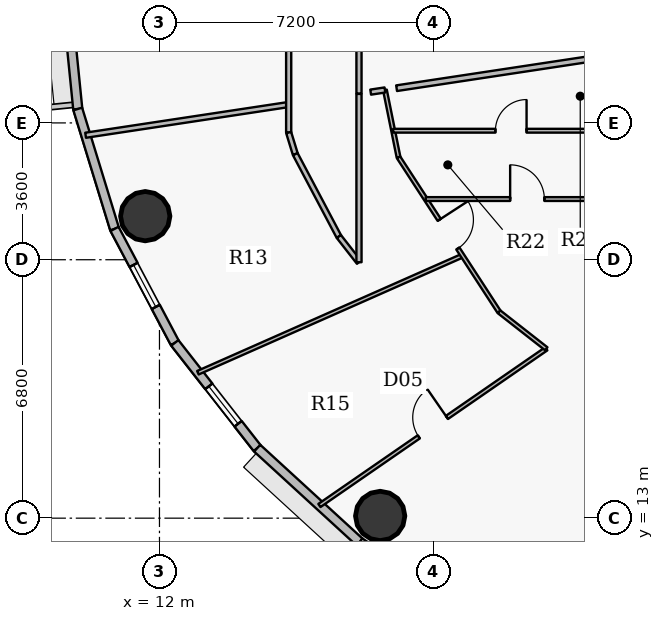
"""IFC4 building model, lengths in metres.
Left out: names, types, materials, properties, quantities, classifications, styles, units other than length and angle.
Written with IfcOpenShell. Run it as: python <this file> out.ifc"""

import sys

from ifc_helpers import new_model, si_unit, direction, frame, frame_2d, origin, origin_2d, place, context, subcontext, project, spatial, rectangle, hollow_circle, extrude, source, transform, mapped, element, fill, save


model = new_model("IFC4")
c1 = context("Model", 3, precision=1e-05, world=origin(), true_north=direction((0.0, 1.0)))
c2 = subcontext(c1, "Body", "Model", "MODEL_VIEW")
j1 = project(units=[si_unit("LENGTHUNIT", "METRE"), si_unit("PLANEANGLEUNIT", "RADIAN")], contexts=[c1])
p1 = place(None, origin())
s1 = spatial("IfcSite", under=j1, at=p1, CompositionType="ELEMENT")
p2 = place(p1, origin())
s2 = spatial("IfcBuilding", under=s1, at=p2, CompositionType="ELEMENT")
p3 = place(p2, frame((0.0, 0.0, 159.9)))
s3 = spatial("IfcBuildingStorey", under=s2, at=p3, CompositionType="ELEMENT", Elevation=159.9)
for number, where, z_axis, x_axis in (
    (1, (11.625, 20.947, 0.0), (0.0, 0.0, 1.0), (1.0, 0.0, 0.0)),
    (2, (17.808, 13.058, 0.0), (0.0, 0.0, 1.0), (1.0, 0.0, 0.0)),
):
    element("IfcColumn", number, at=place(p3, frame(where, z_axis=z_axis, x_axis=x_axis)), inside=s3, PredefinedType="COLUMN", context=c2, shape_type="SweptSolid", body=[
        extrude(hollow_circle(Radius=0.65, WallThickness=0.04, at=origin_2d()), origin(), (0.0, 0.0, 1.0), 3.75),
    ])
p4 = place(p3, frame((9.85, 23.766, 0.0), z_axis=(0.0, 0.0, 1.0), x_axis=(-0.100061534614, 0.994981250723, 0.0)))
e3 = element("IfcWall", 3, at=p4, inside=s3, PredefinedType="SOLIDWALL", context=c2, shape_type="SweptSolid", body=[
    extrude(rectangle(XDim=3.25, YDim=0.24, at=frame_2d((1.625, 0.0))), origin(), (0.0, 0.0, 1.0), 3.5),
])
p5 = place(p3, frame((10.817, 20.611, 0.0), z_axis=(0.0, 0.0, 1.0), x_axis=(-0.293097995113, 0.956082405058, 0.0)))
e4 = element("IfcWall", 4, at=p5, inside=s3, PredefinedType="SOLIDWALL", context=c2, shape_type="SweptSolid", body=[
    extrude(rectangle(XDim=3.3, YDim=0.24, at=frame_2d((1.65, 0.0))), origin(), (0.0, 0.0, 1.0), 3.5),
])
p6 = place(p3, frame((12.404, 17.612, 0.0), z_axis=(0.0, 0.0, 1.0), x_axis=(-0.467586874938, 0.88394712194, 0.0)))
e5 = element("IfcWall", 5, at=p6, inside=s3, PredefinedType="SOLIDWALL", context=c2, shape_type="SweptSolid", body=[
    extrude(rectangle(XDim=3.393, YDim=0.24, at=frame_2d((1.697, 0.0))), origin(), (0.0, 0.0, 1.0), 3.5),
])
p7 = place(p6, frame((1.072, 0.0, 0.9)))
e6 = element("IfcOpeningElement", 6, at=p7, cuts=e5, PredefinedType="OPENING", context=c2, shape_type="SweptSolid", body=[
    extrude(rectangle(XDim=1.25, YDim=1.65, at=origin_2d()), frame((0.625, 0.13, 0.825), z_axis=(0.0, -1.0, 0.0), x_axis=(1.0, 0.0, 0.0)), (0.0, 0.0, 1.0), 0.26),
])
p8 = place(p3, frame((14.572, 14.842, 0.0), z_axis=(0.0, 0.0, 1.0), x_axis=(-0.616287674549, 0.787521112224, 0.0)))
e7 = element("IfcWall", 7, at=p8, inside=s3, PredefinedType="SOLIDWALL", context=c2, shape_type="SweptSolid", body=[
    extrude(rectangle(XDim=3.517, YDim=0.24, at=frame_2d((1.759, 0.0))), origin(), (0.0, 0.0, 1.0), 3.5),
])
p9 = place(p8, frame((0.816, 0.0, 0.9)))
e8 = element("IfcOpeningElement", 8, at=p9, cuts=e7, PredefinedType="OPENING", context=c2, shape_type="SweptSolid", body=[
    extrude(rectangle(XDim=1.25, YDim=1.65, at=origin_2d()), frame((0.625, 0.13, 0.825), z_axis=(0.0, -1.0, 0.0), x_axis=(1.0, 0.0, 0.0)), (0.0, 0.0, 1.0), 0.26),
])
p10 = place(p3, frame((17.268, 12.369, 0.0), z_axis=(0.0, 0.0, 1.0), x_axis=(-0.737076565834, 0.675809245349, 0.0)))
e9 = element("IfcWall", 9, at=p10, inside=s3, PredefinedType="SOLIDWALL", context=c2, shape_type="SweptSolid", body=[
    extrude(rectangle(XDim=3.658, YDim=0.24, at=frame_2d((1.829, 0.0))), origin(), (0.0, 0.0, 1.0), 3.5),
])
p11 = place(p3, frame((20.427, 10.257, 0.0), z_axis=(0.0, 0.0, 1.0), x_axis=(-0.831228998277, 0.555930168657, 0.0)))
e10 = element("IfcWall", 10, at=p11, inside=s3, PredefinedType="SOLIDWALL", context=c2, shape_type="SweptSolid", body=[
    extrude(rectangle(XDim=3.8, YDim=0.24, at=frame_2d((1.9, 0.0))), origin(), (0.0, 0.0, 1.0), 3.5),
])
p12 = place(p3, frame((10.057, 23.075, 0.0), z_axis=(0.0, 0.0, 1.0), x_axis=(0.988756022356, 0.14953771516, 0.0)))
e11 = element("IfcWall", 11, at=p12, inside=s3, PredefinedType="PARTITIONING", context=c2, shape_type="SweptSolid", body=[
    extrude(rectangle(XDim=5.404, YDim=0.135, at=frame_2d((2.702, 0.0))), origin(), (0.0, 0.0, 1.0), 2.935),
])
p13 = place(p3, frame((13.012, 16.827, 0.0), z_axis=(0.0, 0.0, 1.0), x_axis=(0.914460954348, 0.404674144185, 0.0)))
e12 = element("IfcWall", 12, at=p13, inside=s3, PredefinedType="PARTITIONING", context=c2, shape_type="SweptSolid", body=[
    extrude(rectangle(XDim=7.614, YDim=0.1, at=frame_2d((3.807, 0.0))), origin(), (0.0, 0.0, 1.0), 2.935),
])
p14 = place(p3, frame((15.4, 23.146, 0.0), z_axis=(0.0, 0.0, 1.0), x_axis=(0.0, 1.0, 0.0)))
e13 = element("IfcWall", 13, at=p14, inside=s3, PredefinedType="PARTITIONING", context=c2, shape_type="SweptSolid", body=[
    extrude(rectangle(XDim=4.804, YDim=0.135, at=frame_2d((2.402, 0.0))), origin(), (0.0, 0.0, 1.0), 2.935),
])
p15 = place(p14, frame((2.251, 0.0, 0.0)))
e14 = element("IfcOpeningElement", 14, at=p15, cuts=e13, PredefinedType="OPENING", context=c2, shape_type="SweptSolid", body=[
    extrude(rectangle(XDim=1.0, YDim=2.15, at=origin_2d()), frame((0.5, 0.078, 1.075), z_axis=(0.0, -1.0, 0.0), x_axis=(1.0, 0.0, 0.0)), (0.0, 0.0, 1.0), 0.155),
])
p16 = place(p3, frame((15.4, 23.146, 0.0), z_axis=(0.0, 0.0, 1.0), x_axis=(0.293335154151, -0.956009669061, 0.0)))
e15 = element("IfcWall", 15, at=p16, inside=s3, PredefinedType="PARTITIONING", context=c2, shape_type="SweptSolid", body=[
    extrude(rectangle(XDim=0.594, YDim=0.135, at=frame_2d((0.297, 0.0))), origin(), (0.0, 0.0, 1.0), 3.5),
])
p17 = place(p3, frame((15.574, 22.578, 0.0), z_axis=(0.0, 0.0, 1.0), x_axis=(0.46757196543, -0.883955008552, 0.0)))
e16 = element("IfcWall", 16, at=p17, inside=s3, PredefinedType="PARTITIONING", context=c2, shape_type="SweptSolid", body=[
    extrude(rectangle(XDim=2.451, YDim=0.135, at=frame_2d((1.226, 0.0))), origin(), (0.0, 0.0, 1.0), 2.935),
])
p18 = place(p3, frame((16.209, 13.333, 0.0), z_axis=(0.0, 0.0, 1.0), x_axis=(0.82287966827, 0.568215673444, 0.0)))
e17 = element("IfcWall", 17, at=p18, inside=s3, PredefinedType="PARTITIONING", context=c2, shape_type="SweptSolid", body=[
    extrude(rectangle(XDim=7.255, YDim=0.1, at=frame_2d((3.628, 0.0))), origin(), (0.0, 0.0, 1.0), 2.935),
])
p19 = place(p18, frame((3.177, 0.0, 0.0)))
e18 = element("IfcOpeningElement", 18, at=p19, cuts=e17, PredefinedType="OPENING", context=c2, shape_type="SweptSolid", body=[
    extrude(rectangle(XDim=0.9, YDim=2.1, at=origin_2d()), frame((0.45, 0.06, 1.05), z_axis=(0.0, -1.0, 0.0), x_axis=(1.0, 0.0, 0.0)), (0.0, 0.0, 1.0), 0.12),
])
p20 = place(p3, frame((16.72, 20.411, 0.0), z_axis=(0.0, 0.0, 1.0), x_axis=(0.616377221056, -0.787451027914, 0.0)))
e19 = element("IfcWall", 19, at=p20, inside=s3, PredefinedType="PARTITIONING", context=c2, shape_type="SweptSolid", body=[
    extrude(rectangle(XDim=0.859, YDim=0.135, at=frame_2d((0.43, 0.0))), origin(), (0.0, 0.0, 1.0), 3.5),
])
p21 = place(p3, frame((17.25, 19.734, 0.0), z_axis=(0.0, 0.0, 1.0), x_axis=(0.0, 1.0, 0.0)))
e20 = element("IfcWall", 20, at=p21, inside=s3, PredefinedType="PARTITIONING", context=c2, shape_type="SweptSolid", body=[
    extrude(rectangle(XDim=4.429, YDim=0.135, at=frame_2d((2.215, 0.0))), origin(), (0.0, 0.0, 1.0), 2.935),
])
p22 = place(p3, frame((17.933, 24.267, 0.0), z_axis=(0.0, 0.0, 1.0), x_axis=(0.198166528342, -0.980168366682, 0.0)))
e21 = element("IfcWall", 21, at=p22, inside=s3, PredefinedType="PARTITIONING", context=c2, shape_type="SweptSolid", body=[
    extrude(rectangle(XDim=1.809, YDim=0.1, at=frame_2d((0.904, 0.0))), origin(), (0.0, 0.0, 1.0), 2.935),
])
p23 = place(p3, frame((18.15, 23.195, 0.0), z_axis=(0.0, 0.0, 1.0), x_axis=(1.0, 0.0, 0.0)))
e22 = element("IfcWall", 22, at=p23, inside=s3, PredefinedType="PARTITIONING", context=c2, shape_type="SweptSolid", body=[
    extrude(rectangle(XDim=6.2, YDim=0.1, at=frame_2d((3.1, 0.0))), origin(), (0.0, 0.0, 1.0), 2.935),
])
p24 = place(p23, frame((2.69, 0.0, 0.0)))
e23 = element("IfcOpeningElement", 23, at=p24, cuts=e22, PredefinedType="OPENING", context=c2, shape_type="SweptSolid", body=[
    extrude(rectangle(XDim=0.82, YDim=2.1, at=origin_2d()), frame((0.41, 0.06, 1.05), z_axis=(0.0, -1.0, 0.0), x_axis=(1.0, 0.0, 0.0)), (0.0, 0.0, 1.0), 0.12),
])
p25 = place(p3, frame((18.291, 22.494, 0.0), z_axis=(0.0, 0.0, 1.0), x_axis=(0.545405921784, -0.838172047066, 0.0)))
e24 = element("IfcWall", 24, at=p25, inside=s3, PredefinedType="PARTITIONING", context=c2, shape_type="SweptSolid", body=[
    extrude(rectangle(XDim=4.849, YDim=0.1, at=frame_2d((2.425, 0.0))), origin(), (0.0, 0.0, 1.0), 2.935),
])
p26 = place(p25, frame((1.962, 0.0, 0.0)))
e25 = element("IfcOpeningElement", 25, at=p26, cuts=e24, PredefinedType="OPENING", context=c2, shape_type="SweptSolid", body=[
    extrude(rectangle(XDim=0.9, YDim=2.1, at=origin_2d()), frame((0.45, 0.06, 1.05), z_axis=(0.0, -1.0, 0.0), x_axis=(1.0, 0.0, 0.0)), (0.0, 0.0, 1.0), 0.12),
])
p27 = place(p3, frame((19.005, 21.397, 0.0), z_axis=(0.0, 0.0, 1.0), x_axis=(1.0, 0.0, 0.0)))
e26 = element("IfcWall", 26, at=p27, inside=s3, PredefinedType="PARTITIONING", context=c2, shape_type="SweptSolid", body=[
    extrude(rectangle(XDim=5.345, YDim=0.1, at=frame_2d((2.672, 0.0))), origin(), (0.0, 0.0, 1.0), 3.5),
])
p28 = place(p27, frame((2.222, 0.0, 0.0)))
e27 = element("IfcOpeningElement", 27, at=p28, cuts=e26, PredefinedType="OPENING", context=c2, shape_type="SweptSolid", body=[
    extrude(rectangle(XDim=0.9, YDim=2.1, at=origin_2d()), frame((0.45, 0.06, 1.05), z_axis=(0.0, -1.0, 0.0), x_axis=(1.0, 0.0, 0.0)), (0.0, 0.0, 1.0), 0.12),
])
p29 = place(p3, frame((20.936, 18.429, 0.0), z_axis=(0.0, 0.0, 1.0), x_axis=(0.787358146927, -0.61649586249, 0.0)))
e28 = element("IfcWall", 28, at=p29, inside=s3, PredefinedType="PARTITIONING", context=c2, shape_type="SweptSolid", body=[
    extrude(rectangle(XDim=1.579, YDim=0.1, at=frame_2d((0.79, 0.0))), origin(), (0.0, 0.0, 1.0), 3.5),
])
p30 = place(p3, frame((17.25, 26.05, 0.0), z_axis=(0.0, 0.0, 1.0), x_axis=(0.0, -1.0, 0.0)))
e29 = element("IfcWall", 29, at=p30, inside=s3, PredefinedType="PARTITIONING", context=c2, shape_type="SweptSolid", body=[
    extrude(rectangle(XDim=1.876, YDim=0.135, at=frame_2d((0.938, 0.0))), origin(), (0.0, 0.0, 1.0), 3.035),
])
p31 = place(p3, frame((17.558, 24.21, 0.0), z_axis=(0.0, 0.0, 1.0), x_axis=(0.988703952477, 0.149881601124, 0.0)))
e30 = element("IfcWall", 30, at=p31, inside=s3, PredefinedType="PARTITIONING", context=c2, shape_type="SweptSolid", body=[
    extrude(rectangle(XDim=0.38, YDim=0.135, at=frame_2d((0.19, 0.0))), origin(), (0.0, 0.0, 1.0), 3.035),
])
p32 = place(p3, frame((18.24, 24.313, 0.0), z_axis=(0.0, 0.0, 1.0), x_axis=(0.988751262043, 0.149569187364, 0.0)))
e31 = element("IfcWall", 31, at=p32, inside=s3, PredefinedType="PARTITIONING", context=c2, shape_type="SweptSolid", body=[
    extrude(rectangle(XDim=5.848, YDim=0.15, at=frame_2d((2.924, 0.0))), origin(), (0.0, 0.0, 1.0), 3.5),
])
m1 = source(origin(), c2, "Body", "SweptSolid", [
    extrude(rectangle(XDim=1.25, YDim=1.65, at=origin_2d()), frame((0.625, 0.03, 0.825), z_axis=(0.0, -1.0, 0.0), x_axis=(1.0, 0.0, 0.0)), (0.0, 0.0, 1.0), 0.06),
])
p33 = place(p9, origin())
e32 = element("IfcWindow", 32, at=p33, inside=s3, PartitioningType="SINGLE_PANEL", PredefinedType="WINDOW", context=c2, shape_type="MappedRepresentation", body=[
    mapped(m1, transform((0.0, 0.0, 0.0), x_axis=(1.0, 0.0, 0.0), y_axis=(0.0, 1.0, 0.0), z_axis=(0.0, 0.0, 1.0), scale=1.0)),
])
fill(e8, e32)
p34 = place(p7, origin())
e33 = element("IfcWindow", 33, at=p34, inside=s3, PartitioningType="SINGLE_PANEL", PredefinedType="WINDOW", context=c2, shape_type="MappedRepresentation", body=[
    mapped(m1, transform((0.0, 0.0, 0.0), x_axis=(1.0, 0.0, 0.0), y_axis=(0.0, 1.0, 0.0), z_axis=(0.0, 0.0, 1.0), scale=1.0)),
])
fill(e6, e33)
m2 = source(origin(), c2, "Body", "SweptSolid", [
    extrude(rectangle(XDim=0.9, YDim=2.1, at=origin_2d()), frame((0.45, 0.025, 1.05), z_axis=(0.0, -1.0, 0.0), x_axis=(1.0, 0.0, 0.0)), (0.0, 0.0, 1.0), 0.05),
])
p35 = place(p26, origin())
e34 = element("IfcDoor", 34, at=p35, inside=s3, OperationType="SINGLE_SWING_LEFT", PredefinedType="DOOR", context=c2, shape_type="MappedRepresentation", body=[
    mapped(m2, transform((0.0, 0.0, 0.0), x_axis=(1.0, 0.0, 0.0), y_axis=(0.0, 1.0, 0.0), z_axis=(0.0, 0.0, 1.0), scale=1.0)),
])
fill(e25, e34)
p36 = place(p19, origin())
e35 = element("IfcDoor", 35, at=p36, inside=s3, OperationType="SINGLE_SWING_RIGHT", PredefinedType="DOOR", context=c2, shape_type="MappedRepresentation", body=[
    mapped(m2, transform((0.0, 0.0, 0.0), x_axis=(1.0, 0.0, 0.0), y_axis=(0.0, 1.0, 0.0), z_axis=(0.0, 0.0, 1.0), scale=1.0)),
])
fill(e18, e35)
p37 = place(p28, origin())
e36 = element("IfcDoor", 36, at=p37, inside=s3, OperationType="SINGLE_SWING_LEFT", PredefinedType="DOOR", context=c2, shape_type="MappedRepresentation", body=[
    mapped(m2, transform((0.0, 0.0, 0.0), x_axis=(1.0, 0.0, 0.0), y_axis=(0.0, 1.0, 0.0), z_axis=(0.0, 0.0, 1.0), scale=1.0)),
])
fill(e27, e36)
m3 = source(origin(), c2, "Body", "SweptSolid", [
    extrude(rectangle(XDim=0.82, YDim=2.1, at=origin_2d()), frame((0.41, 0.025, 1.05), z_axis=(0.0, -1.0, 0.0), x_axis=(1.0, 0.0, 0.0)), (0.0, 0.0, 1.0), 0.05),
])
p38 = place(p24, origin())
e37 = element("IfcDoor", 37, at=p38, inside=s3, OperationType="SINGLE_SWING_RIGHT", PredefinedType="DOOR", context=c2, shape_type="MappedRepresentation", body=[
    mapped(m3, transform((0.0, 0.0, 0.0), x_axis=(1.0, 0.0, 0.0), y_axis=(0.0, 1.0, 0.0), z_axis=(0.0, 0.0, 1.0), scale=1.0)),
])
fill(e23, e37)
save(model, sys.argv[1])
